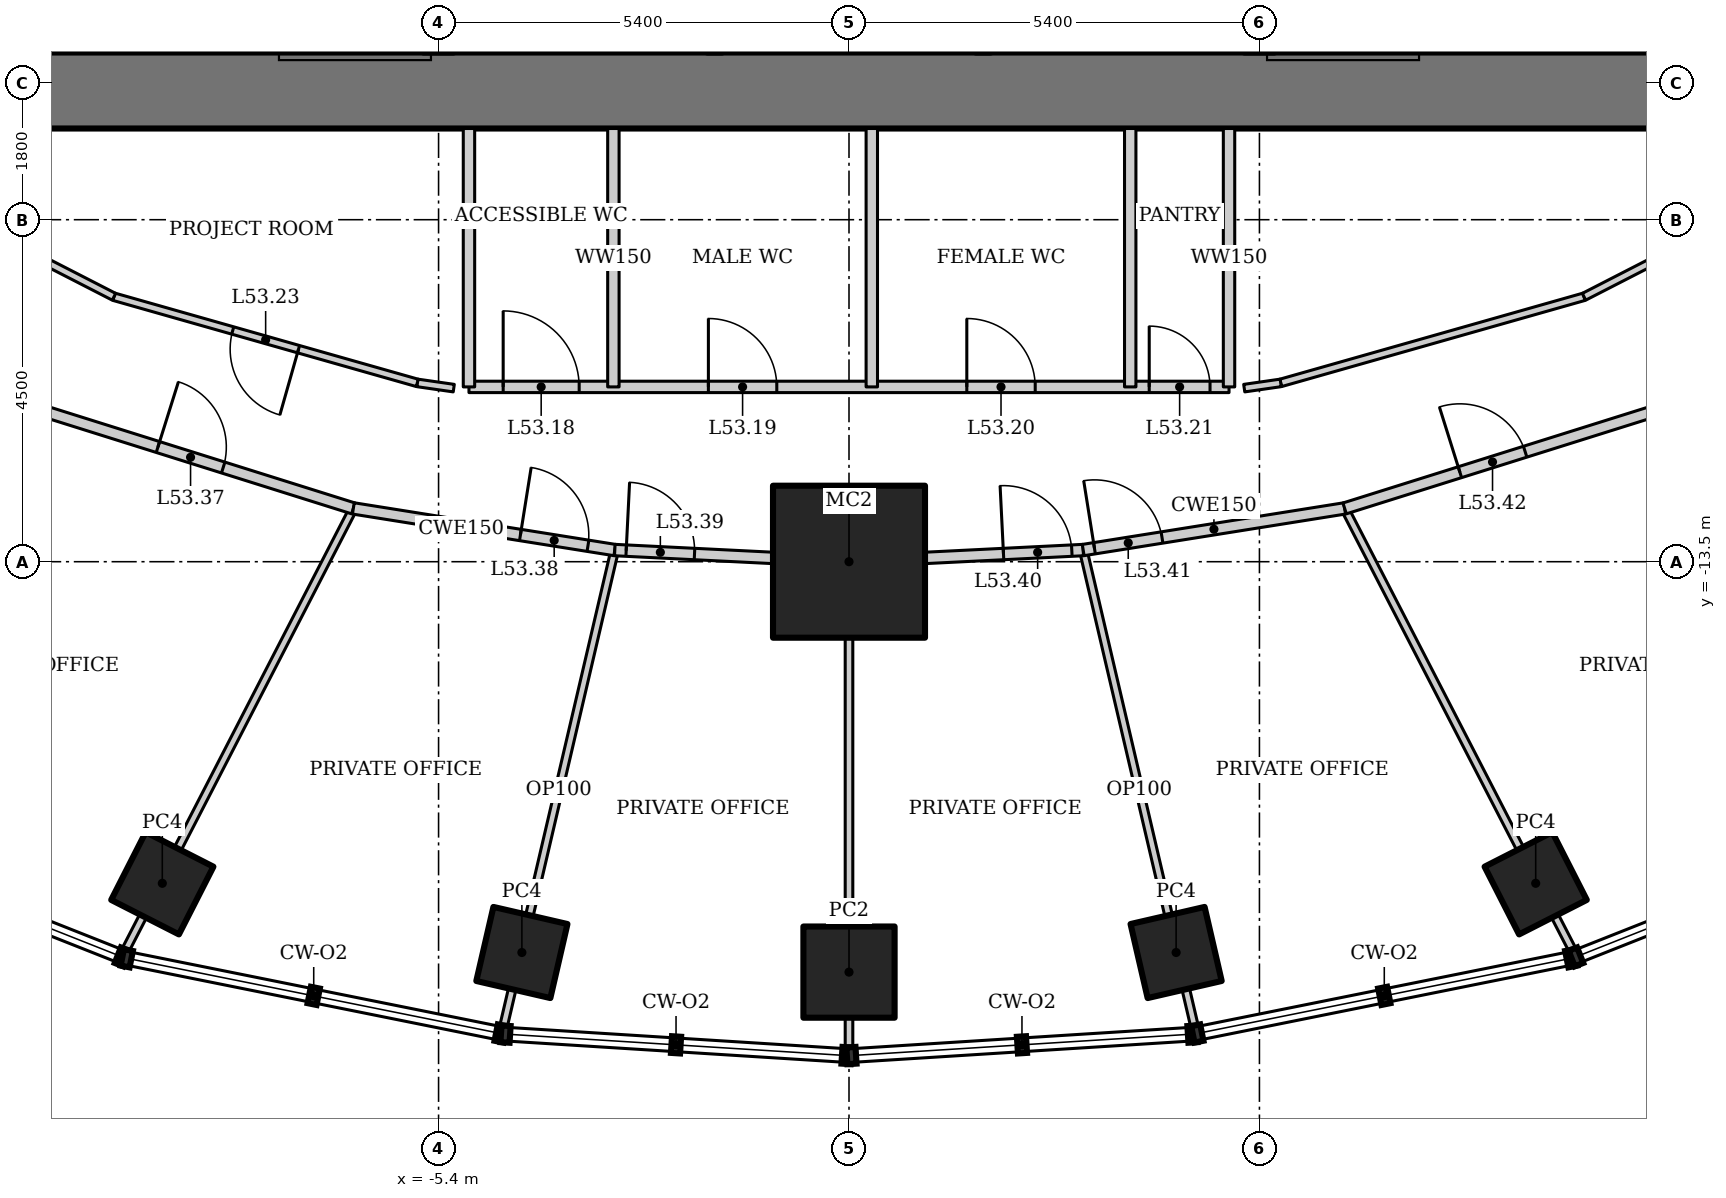
"""IFC4 building model, lengths in metres.
Left out: names, types, materials, properties, quantities, classifications, styles, units other than length and angle.
Written with IfcOpenShell. Run it as: python <this file> out.ifc"""

import sys

from ifc_helpers import new_model, si_unit, direction, frame, frame_2d, origin, origin_2d, place, context, subcontext, project, spatial, rectangle, hollow_rectangle, extrude, element, fill, save


model = new_model("IFC4")
c1 = context("Model", 3, precision=1e-05, world=origin(), true_north=direction((0.0, 1.0)))
c2 = subcontext(c1, "Body", "Model", "MODEL_VIEW")
j1 = project(units=[si_unit("LENGTHUNIT", "METRE"), si_unit("PLANEANGLEUNIT", "RADIAN")], contexts=[c1])
p1 = place(None, origin())
s1 = spatial("IfcSite", under=j1, at=p1, CompositionType="ELEMENT")
p2 = place(p1, origin())
s2 = spatial("IfcBuilding", under=s1, at=p2, CompositionType="ELEMENT")
p3 = place(p2, frame((0.0, 0.0, 228.4)))
s3 = spatial("IfcBuildingStorey", under=s2, at=p3, CompositionType="ELEMENT", Elevation=228.4)
p4 = place(p3, frame((0.0, -13.5, 0.0), z_axis=(0.0, 0.0, 1.0), x_axis=(1.0, 0.0, 0.0)))
e1 = element("IfcColumn", 1, at=p4, inside=s3, PredefinedType="COLUMN", context=c2, shape_type="SweptSolid", body=[
    extrude(hollow_rectangle(XDim=2.0, YDim=2.0, WallThickness=0.17, at=origin_2d()), origin(), (0.0, 0.0, 1.0), 4.2),
])
for number, where, z_axis, x_axis in (
    (2, (-9.035, -17.731, 0.0), (0.0, 0.0, 1.0), (0.454, 0.891, 0.0)),
    (3, (-4.304, -18.642, 0.0), (0.0, 0.0, 1.0), (0.225, 0.974, 0.0)),
):
    element("IfcColumn", number, at=place(p3, frame(where, z_axis=z_axis, x_axis=x_axis)), inside=s3, PredefinedType="COLUMN", context=c2, shape_type="SweptSolid", body=[
        extrude(hollow_rectangle(XDim=1.0, YDim=1.0, WallThickness=0.08, at=origin_2d()), origin(), (0.0, 0.0, 1.0), 4.2),
    ])
p5 = place(p3, frame((0.0, -18.9, 0.0), z_axis=(0.0, 0.0, 1.0), x_axis=(1.0, 0.0, 0.0)))
e4 = element("IfcColumn", 4, at=p5, inside=s3, PredefinedType="COLUMN", context=c2, shape_type="SweptSolid", body=[
    extrude(hollow_rectangle(XDim=1.2, YDim=1.2, WallThickness=0.1, at=origin_2d()), origin(), (0.0, 0.0, 1.0), 4.2),
])
for number, where, z_axis, x_axis in (
    (5, (4.304, -18.642, 0.0), (0.0, 0.0, 1.0), (0.974, 0.225, 0.0)),
    (6, (9.035, -17.731, 0.0), (0.0, 0.0, 1.0), (0.891, 0.454, 0.0)),
):
    element("IfcColumn", number, at=place(p3, frame(where, z_axis=z_axis, x_axis=x_axis)), inside=s3, PredefinedType="COLUMN", context=c2, shape_type="SweptSolid", body=[
        extrude(hollow_rectangle(XDim=1.0, YDim=1.0, WallThickness=0.08, at=origin_2d()), origin(), (0.0, 0.0, 1.0), 4.2),
    ])
p6 = place(p3, frame((-12.2, -7.3, 0.0), z_axis=(0.0, 0.0, 1.0), x_axis=(1.0, 0.0, 0.0)))
e7 = element("IfcWall", 7, at=p6, inside=s3, PredefinedType="SHEAR", context=c2, shape_type="SweptSolid", body=[
    extrude(rectangle(XDim=24.4, YDim=1.0, at=frame_2d((12.2, 0.0))), origin(), (0.0, 0.0, 1.0), 4.2),
])
for number, where, z_axis, x_axis in (
    (8, (-1.767, -2.6, 0.0), (0.0, 0.0, 1.0), (0.0, -1.0, 0.0)),
    (9, (1.767, -2.6, 0.0), (0.0, 0.0, 1.0), (0.0, -1.0, 0.0)),
):
    element("IfcWall", number, at=place(p3, frame(where, z_axis=z_axis, x_axis=x_axis)), inside=s3, PredefinedType="SOLIDWALL", context=c2, shape_type="SweptSolid", body=[
        extrude(rectangle(XDim=4.2, YDim=0.2, at=frame_2d((2.1, 0.0))), origin(), (0.0, 0.0, 1.0), 4.2),
    ])
p7 = place(p3, frame((-9.54, -18.65, 0.0), z_axis=(0.0, 0.0, 1.0), x_axis=(0.458420942987, 0.888735190611, 0.0)))
e10 = element("IfcWall", 10, at=p7, inside=s3, PredefinedType="PARTITIONING", context=c2, shape_type="SweptSolid", body=[
    extrude(rectangle(XDim=6.584, YDim=0.1, at=frame_2d((3.292, 0.0))), origin(), (0.0, 0.0, 1.0), 3.293),
])
p8 = place(p3, frame((-4.556, -19.657, 0.0), z_axis=(0.0, 0.0, 1.0), x_axis=(0.227524978141, 0.973772244584, 0.0)))
e11 = element("IfcWall", 11, at=p8, inside=s3, PredefinedType="PARTITIONING", context=c2, shape_type="SweptSolid", body=[
    extrude(rectangle(XDim=6.48, YDim=0.1, at=frame_2d((3.24, 0.0))), origin(), (0.0, 0.0, 1.0), 3.293),
])
p9 = place(p3, frame((0.0, -19.945, 0.0), z_axis=(0.0, 0.0, 1.0), x_axis=(0.0, 1.0, 0.0)))
e12 = element("IfcWall", 12, at=p9, inside=s3, PredefinedType="PARTITIONING", context=c2, shape_type="SweptSolid", body=[
    extrude(rectangle(XDim=6.445, YDim=0.1, at=frame_2d((3.222, 0.0))), origin(), (0.0, 0.0, 1.0), 3.646),
])
p10 = place(p3, frame((4.556, -19.657, 0.0), z_axis=(0.0, 0.0, 1.0), x_axis=(-0.227524978141, 0.973772244584, 0.0)))
e13 = element("IfcWall", 13, at=p10, inside=s3, PredefinedType="PARTITIONING", context=c2, shape_type="SweptSolid", body=[
    extrude(rectangle(XDim=6.48, YDim=0.1, at=frame_2d((3.24, 0.0))), origin(), (0.0, 0.0, 1.0), 3.293),
])
p11 = place(p3, frame((9.54, -18.65, 0.0), z_axis=(0.0, 0.0, 1.0), x_axis=(-0.458420942987, 0.888735190611, 0.0)))
e14 = element("IfcWall", 14, at=p11, inside=s3, PredefinedType="PARTITIONING", context=c2, shape_type="SweptSolid", body=[
    extrude(rectangle(XDim=6.584, YDim=0.1, at=frame_2d((3.292, 0.0))), origin(), (0.0, 0.0, 1.0), 3.293),
])
p12 = place(p3, frame((-11.001, -11.392, 0.0), z_axis=(0.0, 0.0, 1.0), x_axis=(0.954031103669, -0.299707612903, 0.0)))
e15 = element("IfcWall", 15, at=p12, inside=s3, PredefinedType="PARTITIONING", context=c2, shape_type="SweptSolid", body=[
    extrude(rectangle(XDim=4.695, YDim=0.15, at=frame_2d((2.348, 0.0))), origin(), (0.0, 0.0, 1.0), 4.05),
])
p13 = place(p12, frame((2.0, 0.0, 0.0)))
e16 = element("IfcOpeningElement", 16, at=p13, cuts=e15, PredefinedType="OPENING", context=c2, shape_type="SweptSolid", body=[
    extrude(rectangle(XDim=0.9, YDim=2.1, at=frame_2d((0.45, 1.05))), frame((0.0, 0.085, 0.0), z_axis=(0.0, -1.0, 0.0), x_axis=(1.0, 0.0, 0.0)), (0.0, 0.0, 1.0), 0.17),
])
p14 = place(p3, frame((-6.521, -12.799, 0.0), z_axis=(0.0, 0.0, 1.0), x_axis=(0.987554093087, -0.157279729233, 0.0)))
e17 = element("IfcWall", 17, at=p14, inside=s3, PredefinedType="PARTITIONING", context=c2, shape_type="SweptSolid", body=[
    extrude(rectangle(XDim=3.483, YDim=0.15, at=frame_2d((1.742, 0.0))), origin(), (0.0, 0.0, 1.0), 4.05),
])
p15 = place(p14, frame((2.226, 0.0, 0.0)))
e18 = element("IfcOpeningElement", 18, at=p15, cuts=e17, PredefinedType="OPENING", context=c2, shape_type="SweptSolid", body=[
    extrude(rectangle(XDim=0.9, YDim=2.1, at=frame_2d((0.45, 1.05))), frame((0.0, 0.085, 0.0), z_axis=(0.0, -1.0, 0.0), x_axis=(1.0, 0.0, 0.0)), (0.0, 0.0, 1.0), 0.17),
])
p16 = place(p3, frame((-3.081, -13.347, 0.0), z_axis=(0.0, 0.0, 1.0), x_axis=(0.99876434787, -0.049696855278, 0.0)))
e19 = element("IfcWall", 19, at=p16, inside=s3, PredefinedType="PARTITIONING", context=c2, shape_type="SweptSolid", body=[
    extrude(rectangle(XDim=3.085, YDim=0.15, at=frame_2d((1.542, 0.0))), origin(), (0.0, 0.0, 1.0), 4.05),
])
p17 = place(p16, frame((0.15, 0.0, 0.0)))
e20 = element("IfcOpeningElement", 20, at=p17, cuts=e19, PredefinedType="OPENING", context=c2, shape_type="SweptSolid", body=[
    extrude(rectangle(XDim=0.9, YDim=2.1, at=frame_2d((0.45, 1.05))), frame((0.0, 0.085, 0.0), z_axis=(0.0, -1.0, 0.0), x_axis=(1.0, 0.0, 0.0)), (0.0, 0.0, 1.0), 0.17),
])
p18 = place(p3, frame((0.0, -13.5, 0.0), z_axis=(0.0, 0.0, 1.0), x_axis=(0.99876434787, 0.049696855278, 0.0)))
e21 = element("IfcWall", 21, at=p18, inside=s3, PredefinedType="PARTITIONING", context=c2, shape_type="SweptSolid", body=[
    extrude(rectangle(XDim=3.085, YDim=0.15, at=frame_2d((1.542, 0.0))), origin(), (0.0, 0.0, 1.0), 4.05),
])
p19 = place(p18, frame((2.035, 0.0, 0.0)))
e22 = element("IfcOpeningElement", 22, at=p19, cuts=e21, PredefinedType="OPENING", context=c2, shape_type="SweptSolid", body=[
    extrude(rectangle(XDim=0.9, YDim=2.1, at=frame_2d((0.45, 1.05))), frame((0.0, 0.085, 0.0), z_axis=(0.0, -1.0, 0.0), x_axis=(1.0, 0.0, 0.0)), (0.0, 0.0, 1.0), 0.17),
])
p20 = place(p3, frame((3.081, -13.347, 0.0), z_axis=(0.0, 0.0, 1.0), x_axis=(0.987554093087, 0.157279729233, 0.0)))
e23 = element("IfcWall", 23, at=p20, inside=s3, PredefinedType="PARTITIONING", context=c2, shape_type="SweptSolid", body=[
    extrude(rectangle(XDim=3.483, YDim=0.15, at=frame_2d((1.742, 0.0))), origin(), (0.0, 0.0, 1.0), 4.05),
])
p21 = place(p20, frame((0.15, 0.0, 0.0)))
e24 = element("IfcOpeningElement", 24, at=p21, cuts=e23, PredefinedType="OPENING", context=c2, shape_type="SweptSolid", body=[
    extrude(rectangle(XDim=0.9, YDim=2.1, at=frame_2d((0.45, 1.05))), frame((0.0, 0.085, 0.0), z_axis=(0.0, -1.0, 0.0), x_axis=(1.0, 0.0, 0.0)), (0.0, 0.0, 1.0), 0.17),
])
p22 = place(p3, frame((6.521, -12.799, 0.0), z_axis=(0.0, 0.0, 1.0), x_axis=(0.954031103669, 0.299707612903, 0.0)))
e25 = element("IfcWall", 25, at=p22, inside=s3, PredefinedType="PARTITIONING", context=c2, shape_type="SweptSolid", body=[
    extrude(rectangle(XDim=4.695, YDim=0.15, at=frame_2d((2.348, 0.0))), origin(), (0.0, 0.0, 1.0), 4.05),
])
p23 = place(p22, frame((1.589, 0.0, 0.0)))
e26 = element("IfcOpeningElement", 26, at=p23, cuts=e25, PredefinedType="OPENING", context=c2, shape_type="SweptSolid", body=[
    extrude(rectangle(XDim=0.9, YDim=2.1, at=frame_2d((0.45, 1.05))), frame((0.0, 0.085, 0.0), z_axis=(0.0, -1.0, 0.0), x_axis=(1.0, 0.0, 0.0)), (0.0, 0.0, 1.0), 0.17),
])
p24 = place(p3, frame((-5.0, -11.2, 0.0), z_axis=(0.0, 0.0, 1.0), x_axis=(1.0, 0.0, 0.0)))
e27 = element("IfcWall", 27, at=p24, inside=s3, PredefinedType="SOLIDWALL", context=c2, shape_type="SweptSolid", body=[
    extrude(rectangle(XDim=10.0, YDim=0.15, at=frame_2d((5.0, 0.0))), origin(), (0.0, 0.0, 1.0), 4.05),
])
p25 = place(p24, frame((0.45, 0.0, 0.0)))
e28 = element("IfcOpeningElement", 28, at=p25, cuts=e27, PredefinedType="OPENING", context=c2, shape_type="SweptSolid", body=[
    extrude(rectangle(XDim=1.0, YDim=2.1, at=frame_2d((0.5, 1.05))), frame((0.0, 0.085, 0.0), z_axis=(0.0, -1.0, 0.0), x_axis=(1.0, 0.0, 0.0)), (0.0, 0.0, 1.0), 0.17),
])
p26 = place(p24, frame((3.15, 0.0, 0.0)))
e29 = element("IfcOpeningElement", 29, at=p26, cuts=e27, PredefinedType="OPENING", context=c2, shape_type="SweptSolid", body=[
    extrude(rectangle(XDim=0.9, YDim=2.1, at=frame_2d((0.45, 1.05))), frame((0.0, 0.085, 0.0), z_axis=(0.0, -1.0, 0.0), x_axis=(1.0, 0.0, 0.0)), (0.0, 0.0, 1.0), 0.17),
])
p27 = place(p24, frame((6.55, 0.0, 0.0)))
e30 = element("IfcOpeningElement", 30, at=p27, cuts=e27, PredefinedType="OPENING", context=c2, shape_type="SweptSolid", body=[
    extrude(rectangle(XDim=0.9, YDim=2.1, at=frame_2d((0.45, 1.05))), frame((0.0, 0.085, 0.0), z_axis=(0.0, -1.0, 0.0), x_axis=(1.0, 0.0, 0.0)), (0.0, 0.0, 1.0), 0.17),
])
p28 = place(p24, frame((8.95, 0.0, 0.0)))
e31 = element("IfcOpeningElement", 31, at=p28, cuts=e27, PredefinedType="OPENING", context=c2, shape_type="SweptSolid", body=[
    extrude(rectangle(XDim=0.8, YDim=2.1, at=frame_2d((0.4, 1.05))), frame((0.0, 0.085, 0.0), z_axis=(0.0, -1.0, 0.0), x_axis=(1.0, 0.0, 0.0)), (0.0, 0.0, 1.0), 0.17),
])
for number, where, z_axis, x_axis in (
    (32, (-5.0, -7.8, 0.0), (0.0, 0.0, 1.0), (0.0, -1.0, 0.0)),
    (33, (5.0, -7.8, 0.0), (0.0, 0.0, 1.0), (0.0, -1.0, 0.0)),
    (34, (-3.1, -7.8, 0.0), (0.0, 0.0, 1.0), (0.0, -1.0, 0.0)),
    (35, (0.3, -7.8, 0.0), (0.0, 0.0, 1.0), (0.0, -1.0, 0.0)),
    (36, (3.7, -7.8, 0.0), (0.0, 0.0, 1.0), (0.0, -1.0, 0.0)),
):
    element("IfcWall", number, at=place(p3, frame(where, z_axis=z_axis, x_axis=x_axis)), inside=s3, PredefinedType="SOLIDWALL", context=c2, shape_type="SweptSolid", body=[
        extrude(rectangle(XDim=3.4, YDim=0.15, at=frame_2d((1.7, 0.0))), origin(), (0.0, 0.0, 1.0), 4.05),
    ])
p29 = place(p3, frame((-5.2, -11.216, 0.0), z_axis=(0.0, 0.0, 1.0), x_axis=(-0.989797891768, 0.142478536811, 0.0)))
e37 = element("IfcWall", 37, at=p29, inside=s3, PredefinedType="PARTITIONING", context=c2, shape_type="SweptSolid", body=[
    extrude(rectangle(XDim=0.485, YDim=0.1, at=frame_2d((0.242, 0.0))), origin(), (0.0, 0.0, 1.0), 4.05),
])
p30 = place(p3, frame((-5.68, -11.147, 0.0), z_axis=(0.0, 0.0, 1.0), x_axis=(-0.961973498971, 0.273142796496, 0.0)))
e38 = element("IfcWall", 38, at=p30, inside=s3, PredefinedType="PARTITIONING", context=c2, shape_type="SweptSolid", body=[
    extrude(rectangle(XDim=4.148, YDim=0.1, at=frame_2d((2.074, 0.0))), origin(), (0.0, 0.0, 1.0), 4.05),
])
p31 = place(p30, frame((1.624, 0.0, 0.0)))
e39 = element("IfcOpeningElement", 39, at=p31, cuts=e38, PredefinedType="OPENING", context=c2, shape_type="SweptSolid", body=[
    extrude(rectangle(XDim=0.9, YDim=2.1, at=frame_2d((0.45, 1.05))), frame((0.0, 0.06, 0.0), z_axis=(0.0, -1.0, 0.0), x_axis=(1.0, 0.0, 0.0)), (0.0, 0.0, 1.0), 0.12),
])
p32 = place(p3, frame((-9.67, -10.014, 0.0), z_axis=(0.0, 0.0, 1.0), x_axis=(-0.889605609385, 0.456729525814, 0.0)))
e40 = element("IfcWall", 40, at=p32, inside=s3, PredefinedType="PARTITIONING", context=c2, shape_type="SweptSolid", body=[
    extrude(rectangle(XDim=2.293, YDim=0.1, at=frame_2d((1.146, 0.0))), origin(), (0.0, 0.0, 1.0), 4.05),
])
p33 = place(p3, frame((9.67, -10.014, 0.0), z_axis=(0.0, 0.0, 1.0), x_axis=(-0.961973498971, -0.273142796496, 0.0)))
e41 = element("IfcWall", 41, at=p33, inside=s3, PredefinedType="PARTITIONING", context=c2, shape_type="SweptSolid", body=[
    extrude(rectangle(XDim=4.148, YDim=0.1, at=frame_2d((2.074, 0.0))), origin(), (0.0, 0.0, 1.0), 4.05),
])
p34 = place(p3, frame((5.68, -11.147, 0.0), z_axis=(0.0, 0.0, 1.0), x_axis=(-0.989797891768, -0.142478536811, 0.0)))
e42 = element("IfcWall", 42, at=p34, inside=s3, PredefinedType="PARTITIONING", context=c2, shape_type="SweptSolid", body=[
    extrude(rectangle(XDim=0.485, YDim=0.1, at=frame_2d((0.242, 0.0))), origin(), (0.0, 0.0, 1.0), 4.05),
])
p35 = place(p3, frame((13.415, -8.092, 0.0), z_axis=(0.0, 0.0, 1.0), x_axis=(-0.889620520549, -0.45670048108, 0.0)))
e43 = element("IfcWall", 43, at=p35, inside=s3, PredefinedType="PARTITIONING", context=c2, shape_type="SweptSolid", body=[
    extrude(rectangle(XDim=4.209, YDim=0.1, at=frame_2d((2.104, 0.0))), origin(), (0.0, 0.0, 1.0), 4.05),
])
p36 = place(p25, origin())
e44 = element("IfcDoor", 44, at=p36, inside=s3, OperationType="SINGLE_SWING_LEFT", PredefinedType="DOOR", context=c2, shape_type="SweptSolid", body=[
    extrude(rectangle(XDim=1.0, YDim=2.1, at=frame_2d((0.5, 1.05))), frame((0.0, 0.025, 0.0), z_axis=(0.0, -1.0, 0.0), x_axis=(1.0, 0.0, 0.0)), (0.0, 0.0, 1.0), 0.05),
])
fill(e28, e44)
p37 = place(p26, origin())
e45 = element("IfcDoor", 45, at=p37, inside=s3, OperationType="SINGLE_SWING_LEFT", PredefinedType="DOOR", context=c2, shape_type="SweptSolid", body=[
    extrude(rectangle(XDim=0.9, YDim=2.1, at=frame_2d((0.45, 1.05))), frame((0.0, 0.025, 0.0), z_axis=(0.0, -1.0, 0.0), x_axis=(1.0, 0.0, 0.0)), (0.0, 0.0, 1.0), 0.05),
])
fill(e29, e45)
p38 = place(p27, origin())
e46 = element("IfcDoor", 46, at=p38, inside=s3, OperationType="SINGLE_SWING_LEFT", PredefinedType="DOOR", context=c2, shape_type="SweptSolid", body=[
    extrude(rectangle(XDim=0.9, YDim=2.1, at=frame_2d((0.45, 1.05))), frame((0.0, 0.025, 0.0), z_axis=(0.0, -1.0, 0.0), x_axis=(1.0, 0.0, 0.0)), (0.0, 0.0, 1.0), 0.05),
])
fill(e30, e46)
p39 = place(p28, origin())
e47 = element("IfcDoor", 47, at=p39, inside=s3, OperationType="SINGLE_SWING_LEFT", PredefinedType="DOOR", context=c2, shape_type="SweptSolid", body=[
    extrude(rectangle(XDim=0.8, YDim=2.1, at=frame_2d((0.4, 1.05))), frame((0.0, 0.025, 0.0), z_axis=(0.0, -1.0, 0.0), x_axis=(1.0, 0.0, 0.0)), (0.0, 0.0, 1.0), 0.05),
])
fill(e31, e47)
p40 = place(p31, origin())
e48 = element("IfcDoor", 48, at=p40, inside=s3, OperationType="SINGLE_SWING_LEFT", PredefinedType="DOOR", context=c2, shape_type="SweptSolid", body=[
    extrude(rectangle(XDim=0.9, YDim=2.1, at=frame_2d((0.45, 1.05))), frame((0.0, 0.025, 0.0), z_axis=(0.0, -1.0, 0.0), x_axis=(1.0, 0.0, 0.0)), (0.0, 0.0, 1.0), 0.05),
])
fill(e39, e48)
p41 = place(p13, origin())
e49 = element("IfcDoor", 49, at=p41, inside=s3, OperationType="SINGLE_SWING_LEFT", PredefinedType="DOOR", context=c2, shape_type="SweptSolid", body=[
    extrude(rectangle(XDim=0.9, YDim=2.1, at=frame_2d((0.45, 1.05))), frame((0.0, 0.025, 0.0), z_axis=(0.0, -1.0, 0.0), x_axis=(1.0, 0.0, 0.0)), (0.0, 0.0, 1.0), 0.05),
])
fill(e16, e49)
p42 = place(p15, origin())
e50 = element("IfcDoor", 50, at=p42, inside=s3, OperationType="SINGLE_SWING_LEFT", PredefinedType="DOOR", context=c2, shape_type="SweptSolid", body=[
    extrude(rectangle(XDim=0.9, YDim=2.1, at=frame_2d((0.45, 1.05))), frame((0.0, 0.025, 0.0), z_axis=(0.0, -1.0, 0.0), x_axis=(1.0, 0.0, 0.0)), (0.0, 0.0, 1.0), 0.05),
])
fill(e18, e50)
p43 = place(p17, origin())
e51 = element("IfcDoor", 51, at=p43, inside=s3, OperationType="SINGLE_SWING_LEFT", PredefinedType="DOOR", context=c2, shape_type="SweptSolid", body=[
    extrude(rectangle(XDim=0.9, YDim=2.1, at=frame_2d((0.45, 1.05))), frame((0.0, 0.025, 0.0), z_axis=(0.0, -1.0, 0.0), x_axis=(1.0, 0.0, 0.0)), (0.0, 0.0, 1.0), 0.05),
])
fill(e20, e51)
p44 = place(p19, origin())
e52 = element("IfcDoor", 52, at=p44, inside=s3, OperationType="SINGLE_SWING_LEFT", PredefinedType="DOOR", context=c2, shape_type="SweptSolid", body=[
    extrude(rectangle(XDim=0.9, YDim=2.1, at=frame_2d((0.45, 1.05))), frame((0.0, 0.025, 0.0), z_axis=(0.0, -1.0, 0.0), x_axis=(1.0, 0.0, 0.0)), (0.0, 0.0, 1.0), 0.05),
])
fill(e22, e52)
p45 = place(p21, origin())
e53 = element("IfcDoor", 53, at=p45, inside=s3, OperationType="SINGLE_SWING_LEFT", PredefinedType="DOOR", context=c2, shape_type="SweptSolid", body=[
    extrude(rectangle(XDim=0.9, YDim=2.1, at=frame_2d((0.45, 1.05))), frame((0.0, 0.025, 0.0), z_axis=(0.0, -1.0, 0.0), x_axis=(1.0, 0.0, 0.0)), (0.0, 0.0, 1.0), 0.05),
])
fill(e24, e53)
p46 = place(p23, origin())
e54 = element("IfcDoor", 54, at=p46, inside=s3, OperationType="SINGLE_SWING_LEFT", PredefinedType="DOOR", context=c2, shape_type="SweptSolid", body=[
    extrude(rectangle(XDim=0.9, YDim=2.1, at=frame_2d((0.45, 1.05))), frame((0.0, 0.025, 0.0), z_axis=(0.0, -1.0, 0.0), x_axis=(1.0, 0.0, 0.0)), (0.0, 0.0, 1.0), 0.05),
])
fill(e26, e54)
save(model, sys.argv[1])
